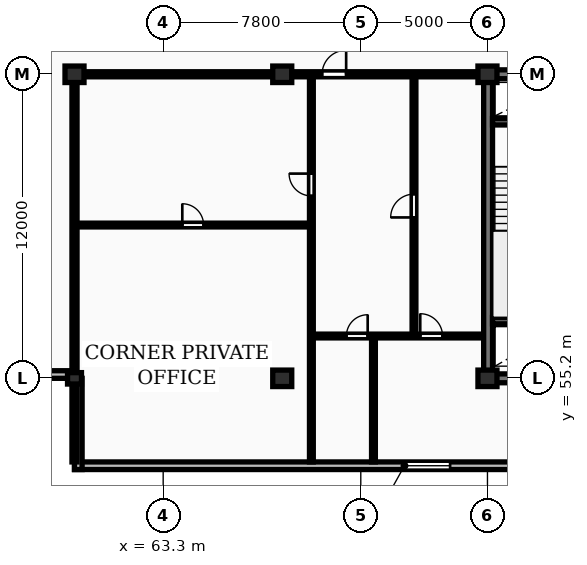
"""IFC4 building model, lengths in metres.
Left out: names, types, materials, properties, quantities, classifications, styles, units other than length and angle.
Written with IfcOpenShell. Run it as: python <this file> out.ifc"""

import sys

from ifc_helpers import new_model, si_unit, direction, frame, frame_2d, origin, origin_2d, place, context, subcontext, project, spatial, rectangle, extrude, element, fill, save


model = new_model("IFC4")
c1 = context("Model", 3, precision=1e-05, world=origin(), true_north=direction((0.0, 1.0)))
c2 = subcontext(c1, "Body", "Model", "MODEL_VIEW")
j1 = project(units=[si_unit("LENGTHUNIT", "METRE"), si_unit("PLANEANGLEUNIT", "RADIAN")], contexts=[c1])
p1 = place(None, origin())
s1 = spatial("IfcSite", under=j1, at=p1, CompositionType="ELEMENT")
p2 = place(p1, origin())
s2 = spatial("IfcBuilding", under=s1, at=p2, CompositionType="ELEMENT")
p3 = place(p2, frame((0.0, 0.0, 249.35)))
s3 = spatial("IfcBuildingStorey", under=s2, at=p3, CompositionType="ELEMENT", Elevation=249.35)
p4 = place(p3, frame((59.8, 55.2, 0.0), z_axis=(0.0, 0.0, 1.0), x_axis=(1.0, 0.0, 0.0)))
e1 = element("IfcColumn", 1, at=p4, inside=s3, PredefinedType="PILASTER", context=c2, shape_type="SweptSolid", body=[
    extrude(rectangle(XDim=0.55, YDim=0.45, at=origin_2d()), origin(), (0.0, 0.0, 1.0), 3.45),
])
for number, where, z_axis, x_axis in (
    (2, (59.8, 67.2, 0.0), (0.0, 0.0, 1.0), (1.0, 0.0, 0.0)),
    (3, (68.0, 55.2, 0.0), (0.0, 0.0, 1.0), (1.0, 0.0, 0.0)),
    (4, (68.0, 67.2, 0.0), (0.0, 0.0, 1.0), (1.0, 0.0, 0.0)),
    (5, (76.1, 55.2, 0.0), (0.0, 0.0, 1.0), (1.0, 0.0, 0.0)),
    (6, (76.1, 67.2, 0.0), (0.0, 0.0, 1.0), (1.0, 0.0, 0.0)),
):
    element("IfcColumn", number, at=place(p3, frame(where, z_axis=z_axis, x_axis=x_axis)), inside=s3, PredefinedType="COLUMN", context=c2, shape_type="SweptSolid", body=[
        extrude(rectangle(XDim=0.75, YDim=0.65, at=origin_2d()), origin(), (0.0, 0.0, 1.0), 3.45),
    ])
p5 = place(p3, frame((59.8, 51.75, 0.0), z_axis=(0.0, 0.0, 1.0), x_axis=(1.0, 0.0, 0.0)))
e7 = element("IfcWall", 7, at=p5, inside=s3, PredefinedType="STANDARD", context=c2, shape_type="SweptSolid", body=[
    extrude(rectangle(XDim=68.6, YDim=0.3, at=frame_2d((34.3, 0.0))), origin(), (0.0, 0.0, 1.0), 3.17),
])
p6 = place(p5, frame((13.025, 0.0, 0.85)))
e8 = element("IfcOpeningElement", 8, at=p6, cuts=e7, PredefinedType="OPENING", context=c2, shape_type="SweptSolid", body=[
    extrude(rectangle(XDim=1.8, YDim=1.8, at=frame_2d((0.9, 0.9))), frame((0.0, 0.16, 0.0), z_axis=(0.0, -1.0, 0.0), x_axis=(1.0, 0.0, 0.0)), (0.0, 0.0, 1.0), 0.32),
])
p7 = place(p5, frame((56.375, 0.0, 0.85)))
e9 = element("IfcOpeningElement", 9, at=p7, cuts=e7, PredefinedType="OPENING", context=c2, shape_type="SweptSolid", body=[
    extrude(rectangle(XDim=1.8, YDim=1.8, at=frame_2d((0.9, 0.9))), frame((0.0, 0.16, 0.0), z_axis=(0.0, -1.0, 0.0), x_axis=(1.0, 0.0, 0.0)), (0.0, 0.0, 1.0), 0.32),
])
p8 = place(p3, frame((56.2, 55.35, 0.0), z_axis=(0.0, 0.0, 1.0), x_axis=(1.0, 0.0, 0.0)))
e10 = element("IfcWall", 10, at=p8, inside=s3, PredefinedType="STANDARD", context=c2, shape_type="SweptSolid", body=[
    extrude(rectangle(XDim=3.6, YDim=0.3, at=frame_2d((1.8, 0.0))), origin(), (0.0, 0.0, 1.0), 3.17),
])
p9 = place(p3, frame((59.95, 55.2, 0.0), z_axis=(0.0, 0.0, 1.0), x_axis=(0.0, -1.0, 0.0)))
e11 = element("IfcWall", 11, at=p9, inside=s3, PredefinedType="STANDARD", context=c2, shape_type="SweptSolid", body=[
    extrude(rectangle(XDim=3.6, YDim=0.3, at=frame_2d((1.8, 0.0))), origin(), (0.0, 0.0, 1.0), 3.17),
])
p10 = place(p3, frame((75.95, 55.2, 0.0), z_axis=(0.0, 0.0, 1.0), x_axis=(1.0, 0.0, 0.0)))
e12 = element("IfcWall", 12, at=p10, inside=s3, PredefinedType="SHEAR", context=c2, shape_type="SweptSolid", body=[
    extrude(rectangle(XDim=36.3, YDim=0.35, at=frame_2d((18.15, 0.0))), origin(), (0.0, 0.0, 1.0), 3.45),
])
p11 = place(p3, frame((76.125, 55.375, 0.0), z_axis=(0.0, 0.0, 1.0), x_axis=(0.0, 1.0, 0.0)))
e13 = element("IfcWall", 13, at=p11, inside=s3, PredefinedType="SHEAR", context=c2, shape_type="SweptSolid", body=[
    extrude(rectangle(XDim=11.65, YDim=0.35, at=frame_2d((5.825, 0.0))), origin(), (0.0, 0.0, 1.0), 3.45),
])
p12 = place(p3, frame((75.95, 67.2, 0.0), z_axis=(0.0, 0.0, 1.0), x_axis=(1.0, 0.0, 0.0)))
e14 = element("IfcWall", 14, at=p12, inside=s3, PredefinedType="SHEAR", context=c2, shape_type="SweptSolid", body=[
    extrude(rectangle(XDim=36.3, YDim=0.35, at=frame_2d((18.15, 0.0))), origin(), (0.0, 0.0, 1.0), 3.45),
])
p13 = place(p12, frame((5.25, 0.0, 0.0)))
e15 = element("IfcOpeningElement", 15, at=p13, cuts=e14, PredefinedType="OPENING", context=c2, shape_type="SweptSolid", body=[
    extrude(rectangle(XDim=1.0, YDim=2.15, at=frame_2d((0.5, 1.075))), frame((0.0, 0.185, 0.0), z_axis=(0.0, -1.0, 0.0), x_axis=(1.0, 0.0, 0.0)), (0.0, 0.0, 1.0), 0.37),
])
p14 = place(p12, frame((21.6, 0.0, 0.0)))
e16 = element("IfcOpeningElement", 16, at=p14, cuts=e14, PredefinedType="OPENING", context=c2, shape_type="SweptSolid", body=[
    extrude(rectangle(XDim=1.5, YDim=2.2, at=frame_2d((0.75, 1.1))), frame((0.0, 0.185, 0.0), z_axis=(0.0, -1.0, 0.0), x_axis=(1.0, 0.0, 0.0)), (0.0, 0.0, 1.0), 0.37),
])
p15 = place(p12, frame((30.45, 0.0, 0.0)))
e17 = element("IfcOpeningElement", 17, at=p15, cuts=e14, PredefinedType="OPENING", context=c2, shape_type="SweptSolid", body=[
    extrude(rectangle(XDim=1.0, YDim=2.15, at=frame_2d((0.5, 1.075))), frame((0.0, 0.185, 0.0), z_axis=(0.0, -1.0, 0.0), x_axis=(1.0, 0.0, 0.0)), (0.0, 0.0, 1.0), 0.37),
])
for number, where, z_axis, x_axis in (
    (18, (76.3, 57.475, 0.0), (0.0, 0.0, 1.0), (1.0, 0.0, 0.0)),
    (19, (76.3, 65.325, 0.0), (0.0, 0.0, 1.0), (1.0, 0.0, 0.0)),
):
    element("IfcWall", number, at=place(p3, frame(where, z_axis=z_axis, x_axis=x_axis)), inside=s3, PredefinedType="SHEAR", context=c2, shape_type="SweptSolid", body=[
        extrude(rectangle(XDim=3.24, YDim=0.25, at=frame_2d((1.62, 0.0))), origin(), (0.0, 0.0, 1.0), 3.45),
    ])
p16 = place(p3, frame((59.8, 51.9, 0.0), z_axis=(0.0, 0.0, 1.0), x_axis=(0.0, 1.0, 0.0)))
e20 = element("IfcWall", 20, at=p16, inside=s3, PredefinedType="PARTITIONING", context=c2, shape_type="SweptSolid", body=[
    extrude(rectangle(XDim=15.3, YDim=0.2, at=frame_2d((7.65, 0.0))), origin(), (0.0, 0.0, 1.0), 2.477),
])
p17 = place(p3, frame((59.8, 61.25, 0.0), z_axis=(0.0, 0.0, 1.0), x_axis=(1.0, 0.0, 0.0)))
e21 = element("IfcWall", 21, at=p17, inside=s3, PredefinedType="PARTITIONING", context=c2, shape_type="SweptSolid", body=[
    extrude(rectangle(XDim=9.35, YDim=0.15, at=frame_2d((4.675, 0.0))), origin(), (0.0, 0.0, 1.0), 3.17),
])
p18 = place(p17, frame((4.255, 0.0, 0.0)))
e22 = element("IfcOpeningElement", 22, at=p18, cuts=e21, PredefinedType="OPENING", context=c2, shape_type="SweptSolid", body=[
    extrude(rectangle(XDim=0.84, YDim=2.04, at=frame_2d((0.42, 1.02))), frame((0.0, 0.085, 0.0), z_axis=(0.0, -1.0, 0.0), x_axis=(1.0, 0.0, 0.0)), (0.0, 0.0, 1.0), 0.17),
])
p19 = place(p3, frame((69.15, 51.9, 0.0), z_axis=(0.0, 0.0, 1.0), x_axis=(0.0, 1.0, 0.0)))
e23 = element("IfcWall", 23, at=p19, inside=s3, PredefinedType="PARTITIONING", context=c2, shape_type="SweptSolid", body=[
    extrude(rectangle(XDim=15.25, YDim=0.15, at=frame_2d((7.625, 0.0))), origin(), (0.0, 0.0, 1.0), 3.17),
])
p20 = place(p19, frame((10.5, 0.0, 0.0)))
e24 = element("IfcOpeningElement", 24, at=p20, cuts=e23, PredefinedType="OPENING", context=c2, shape_type="SweptSolid", body=[
    extrude(rectangle(XDim=0.88, YDim=2.06, at=frame_2d((0.44, 1.03))), frame((0.0, 0.085, 0.0), z_axis=(0.0, -1.0, 0.0), x_axis=(1.0, 0.0, 0.0)), (0.0, 0.0, 1.0), 0.17),
])
p21 = place(p3, frame((73.2, 56.87, 0.0), z_axis=(0.0, 0.0, 1.0), x_axis=(0.0, 1.0, 0.0)))
e25 = element("IfcWall", 25, at=p21, inside=s3, PredefinedType="PARTITIONING", context=c2, shape_type="SweptSolid", body=[
    extrude(rectangle(XDim=10.28, YDim=0.15, at=frame_2d((5.14, 0.0))), origin(), (0.0, 0.0, 1.0), 3.17),
])
p22 = place(p21, frame((4.68, 0.0, 0.0)))
e26 = element("IfcOpeningElement", 26, at=p22, cuts=e25, PredefinedType="OPENING", context=c2, shape_type="SweptSolid", body=[
    extrude(rectangle(XDim=0.92, YDim=2.08, at=frame_2d((0.46, 1.04))), frame((0.0, 0.085, 0.0), z_axis=(0.0, -1.0, 0.0), x_axis=(1.0, 0.0, 0.0)), (0.0, 0.0, 1.0), 0.17),
])
p23 = place(p3, frame((71.6, 51.9, 0.0), z_axis=(0.0, 0.0, 1.0), x_axis=(0.0, 1.0, 0.0)))
e27 = element("IfcWall", 27, at=p23, inside=s3, PredefinedType="PARTITIONING", context=c2, shape_type="SweptSolid", body=[
    extrude(rectangle(XDim=4.97, YDim=0.15, at=frame_2d((2.485, 0.0))), origin(), (0.0, 0.0, 1.0), 3.17),
])
p24 = place(p3, frame((69.17, 56.87, 0.0), z_axis=(0.0, 0.0, 1.0), x_axis=(1.0, 0.0, 0.0)))
e28 = element("IfcWall", 28, at=p24, inside=s3, PredefinedType="PARTITIONING", context=c2, shape_type="SweptSolid", body=[
    extrude(rectangle(XDim=6.76, YDim=0.15, at=frame_2d((3.38, 0.0))), origin(), (0.0, 0.0, 1.0), 3.17),
])
p25 = place(p24, frame((1.362, 0.0, 0.0)))
e29 = element("IfcOpeningElement", 29, at=p25, cuts=e28, PredefinedType="OPENING", context=c2, shape_type="SweptSolid", body=[
    extrude(rectangle(XDim=0.84, YDim=2.04, at=frame_2d((0.42, 1.02))), frame((0.0, 0.085, 0.0), z_axis=(0.0, -1.0, 0.0), x_axis=(1.0, 0.0, 0.0)), (0.0, 0.0, 1.0), 0.17),
])
p26 = place(p24, frame((4.277, 0.0, 0.0)))
e30 = element("IfcOpeningElement", 30, at=p26, cuts=e28, PredefinedType="OPENING", context=c2, shape_type="SweptSolid", body=[
    extrude(rectangle(XDim=0.88, YDim=2.06, at=frame_2d((0.44, 1.03))), frame((0.0, 0.085, 0.0), z_axis=(0.0, -1.0, 0.0), x_axis=(1.0, 0.0, 0.0)), (0.0, 0.0, 1.0), 0.17),
])
p27 = place(p3, frame((59.8, 67.2, 0.0), z_axis=(0.0, 0.0, 1.0), x_axis=(1.0, 0.0, 0.0)))
e31 = element("IfcWall", 31, at=p27, inside=s3, PredefinedType="PARTITIONING", context=c2, shape_type="SweptSolid", body=[
    extrude(rectangle(XDim=16.15, YDim=0.2, at=frame_2d((8.075, 0.0))), origin(), (0.0, 0.0, 1.0), 2.633),
])
p28 = place(p27, frame((9.772, 0.0, 0.0)))
e32 = element("IfcOpeningElement", 32, at=p28, cuts=e31, PredefinedType="OPENING", context=c2, shape_type="SweptSolid", body=[
    extrude(rectangle(XDim=0.95, YDim=2.15, at=frame_2d((0.475, 1.075))), frame((0.0, 0.11, 0.0), z_axis=(0.0, -1.0, 0.0), x_axis=(1.0, 0.0, 0.0)), (0.0, 0.0, 1.0), 0.22),
])
p29 = place(p6, origin())
e33 = element("IfcWindow", 33, at=p29, inside=s3, PartitioningType="SINGLE_PANEL", PredefinedType="WINDOW", context=c2, shape_type="SweptSolid", body=[
    extrude(rectangle(XDim=1.8, YDim=1.8, at=frame_2d((0.9, 0.9))), frame((0.0, 0.03, 0.0), z_axis=(0.0, -1.0, 0.0), x_axis=(1.0, 0.0, 0.0)), (0.0, 0.0, 1.0), 0.06),
])
fill(e8, e33)
p30 = place(p18, origin())
e34 = element("IfcDoor", 34, at=p30, inside=s3, OperationType="SINGLE_SWING_LEFT", PredefinedType="DOOR", context=c2, shape_type="SweptSolid", body=[
    extrude(rectangle(XDim=0.84, YDim=2.04, at=frame_2d((0.42, 1.02))), frame((0.0, 0.025, 0.0), z_axis=(0.0, -1.0, 0.0), x_axis=(1.0, 0.0, 0.0)), (0.0, 0.0, 1.0), 0.05),
])
fill(e22, e34)
p31 = place(p20, origin())
e35 = element("IfcDoor", 35, at=p31, inside=s3, OperationType="SINGLE_SWING_RIGHT", PredefinedType="DOOR", context=c2, shape_type="SweptSolid", body=[
    extrude(rectangle(XDim=0.88, YDim=2.06, at=frame_2d((0.44, 1.03))), frame((0.0, 0.025, 0.0), z_axis=(0.0, -1.0, 0.0), x_axis=(1.0, 0.0, 0.0)), (0.0, 0.0, 1.0), 0.05),
])
fill(e24, e35)
p32 = place(p22, origin())
e36 = element("IfcDoor", 36, at=p32, inside=s3, OperationType="SINGLE_SWING_LEFT", PredefinedType="DOOR", context=c2, shape_type="SweptSolid", body=[
    extrude(rectangle(XDim=0.92, YDim=2.08, at=frame_2d((0.46, 1.04))), frame((0.0, 0.025, 0.0), z_axis=(0.0, -1.0, 0.0), x_axis=(1.0, 0.0, 0.0)), (0.0, 0.0, 1.0), 0.05),
])
fill(e26, e36)
p33 = place(p25, origin())
e37 = element("IfcDoor", 37, at=p33, inside=s3, OperationType="SINGLE_SWING_RIGHT", PredefinedType="DOOR", context=c2, shape_type="SweptSolid", body=[
    extrude(rectangle(XDim=0.84, YDim=2.04, at=frame_2d((0.42, 1.02))), frame((0.0, 0.025, 0.0), z_axis=(0.0, -1.0, 0.0), x_axis=(1.0, 0.0, 0.0)), (0.0, 0.0, 1.0), 0.05),
])
fill(e29, e37)
p34 = place(p26, origin())
e38 = element("IfcDoor", 38, at=p34, inside=s3, OperationType="SINGLE_SWING_LEFT", PredefinedType="DOOR", context=c2, shape_type="SweptSolid", body=[
    extrude(rectangle(XDim=0.88, YDim=2.06, at=frame_2d((0.44, 1.03))), frame((0.0, 0.025, 0.0), z_axis=(0.0, -1.0, 0.0), x_axis=(1.0, 0.0, 0.0)), (0.0, 0.0, 1.0), 0.05),
])
fill(e30, e38)
p35 = place(p28, origin())
e39 = element("IfcDoor", 39, at=p35, inside=s3, OperationType="SINGLE_SWING_RIGHT", PredefinedType="DOOR", context=c2, shape_type="SweptSolid", body=[
    extrude(rectangle(XDim=0.95, YDim=2.15, at=frame_2d((0.475, 1.075))), frame((0.0, 0.025, 0.0), z_axis=(0.0, -1.0, 0.0), x_axis=(1.0, 0.0, 0.0)), (0.0, 0.0, 1.0), 0.05),
])
fill(e32, e39)
save(model, sys.argv[1])
